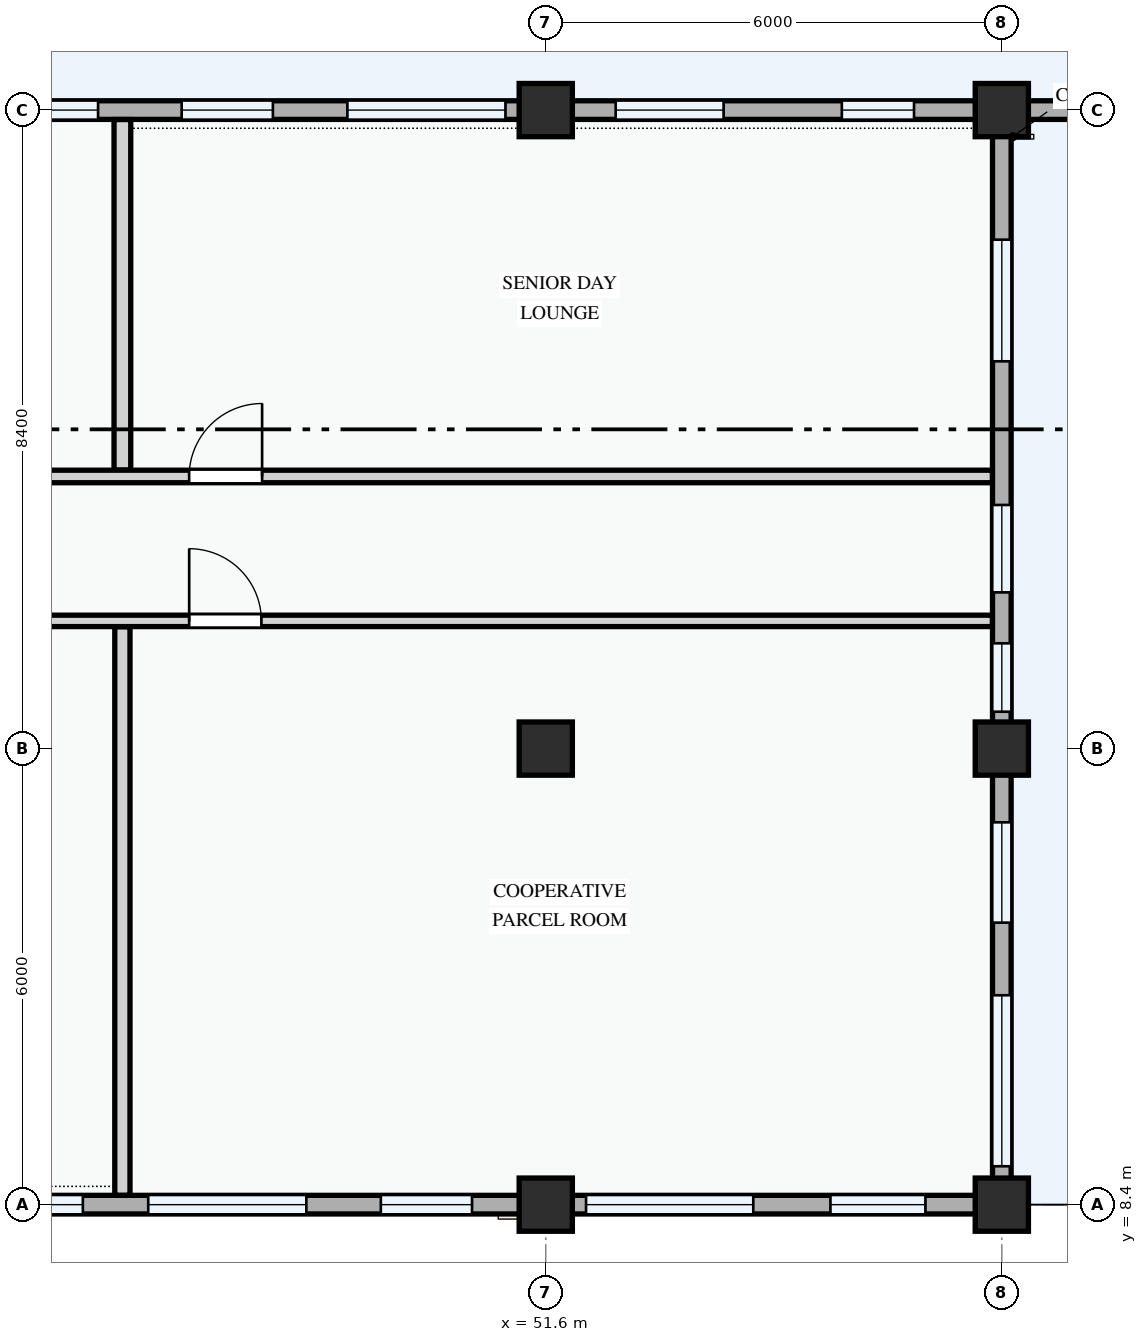
"""IFC4 building model, lengths in metres.
Left out: names, types, materials, properties, quantities, classifications, styles, units other than length and angle.
Written with IfcOpenShell. Run it as: python <this file> out.ifc"""

import sys

from ifc_helpers import new_model, si_unit, direction, frame, frame_2d, origin, origin_2d, place, context, subcontext, project, spatial, rectangle, extrude, element, fill, save


model = new_model("IFC4")
c1 = context("Model", 3, precision=1e-05, world=origin(), true_north=direction((0.0, 1.0)))
c2 = subcontext(c1, "Body", "Model", "MODEL_VIEW")
j1 = project(units=[si_unit("LENGTHUNIT", "METRE"), si_unit("PLANEANGLEUNIT", "RADIAN")], contexts=[c1])
p1 = place(None, origin())
s1 = spatial("IfcSite", under=j1, at=p1, CompositionType="ELEMENT")
p2 = place(p1, origin())
s2 = spatial("IfcBuilding", under=s1, at=p2, CompositionType="ELEMENT")
p3 = place(p2, origin())
s3 = spatial("IfcBuildingStorey", under=s2, at=p3, CompositionType="ELEMENT", Elevation=0.0)
for number, where, z_axis, x_axis in (
    (1, (51.6, 8.4, 0.0), (0.0, 0.0, 1.0), (1.0, 0.0, 0.0)),
    (2, (51.6, 14.4, 0.0), (0.0, 0.0, 1.0), (1.0, 0.0, 0.0)),
    (3, (51.6, 22.8, 0.0), (0.0, 0.0, 1.0), (1.0, 0.0, 0.0)),
    (4, (57.6, 8.4, 0.0), (0.0, 0.0, 1.0), (1.0, 0.0, 0.0)),
    (5, (57.6, 14.4, 0.0), (0.0, 0.0, 1.0), (1.0, 0.0, 0.0)),
    (6, (57.6, 22.8, 0.0), (0.0, 0.0, 1.0), (1.0, 0.0, 0.0)),
):
    element("IfcColumn", number, at=place(p3, frame(where, z_axis=z_axis, x_axis=x_axis)), inside=s3, PredefinedType="COLUMN", context=c2, shape_type="SweptSolid", body=[
        extrude(rectangle(XDim=0.7, YDim=0.7, at=origin_2d()), origin(), (0.0, 0.0, 1.0), 4.5),
    ])
p4 = place(p3, frame((43.2, 8.4, 0.0), z_axis=(0.0, 0.0, 1.0), x_axis=(1.0, 0.0, 0.0)))
e7 = element("IfcWall", 7, at=p4, inside=s3, PredefinedType="STANDARD", context=c2, shape_type="SweptSolid", body=[
    extrude(rectangle(XDim=8.4, YDim=0.245, at=frame_2d((4.2, 0.0))), origin(), (0.0, 0.0, 1.0), 3.485),
])
p5 = place(p4, frame((0.71, 0.0, 0.78)))
e8 = element("IfcOpeningElement", 8, at=p5, cuts=e7, PredefinedType="OPENING", context=c2, shape_type="SweptSolid", body=[
    extrude(rectangle(XDim=1.6, YDim=1.55, at=frame_2d((0.8, 0.775))), frame((0.0, 0.133, 0.0), z_axis=(0.0, -1.0, 0.0), x_axis=(1.0, 0.0, 0.0)), (0.0, 0.0, 1.0), 0.265),
])
p6 = place(p4, frame((3.17, 0.0, 0.78)))
e9 = element("IfcOpeningElement", 9, at=p6, cuts=e7, PredefinedType="OPENING", context=c2, shape_type="SweptSolid", body=[
    extrude(rectangle(XDim=2.08, YDim=1.52, at=frame_2d((1.04, 0.76))), frame((0.0, 0.133, 0.0), z_axis=(0.0, -1.0, 0.0), x_axis=(1.0, 0.0, 0.0)), (0.0, 0.0, 1.0), 0.265),
])
p7 = place(p4, frame((6.23, 0.0, 0.78)))
e10 = element("IfcOpeningElement", 10, at=p7, cuts=e7, PredefinedType="OPENING", context=c2, shape_type="SweptSolid", body=[
    extrude(rectangle(XDim=1.2, YDim=1.5, at=frame_2d((0.6, 0.75))), frame((0.0, 0.133, 0.0), z_axis=(0.0, -1.0, 0.0), x_axis=(1.0, 0.0, 0.0)), (0.0, 0.0, 1.0), 0.265),
])
p8 = place(p3, frame((51.6, 8.4, 0.0), z_axis=(0.0, 0.0, 1.0), x_axis=(1.0, 0.0, 0.0)))
e11 = element("IfcWall", 11, at=p8, inside=s3, PredefinedType="STANDARD", context=c2, shape_type="SweptSolid", body=[
    extrude(rectangle(XDim=6.0, YDim=0.245, at=frame_2d((3.0, 0.0))), origin(), (0.0, 0.0, 1.0), 3.585),
])
p9 = place(p8, frame((0.53, 0.0, 0.78)))
e12 = element("IfcOpeningElement", 12, at=p9, cuts=e11, PredefinedType="OPENING", context=c2, shape_type="SweptSolid", body=[
    extrude(rectangle(XDim=2.2, YDim=1.75, at=frame_2d((1.1, 0.875))), frame((0.0, 0.133, 0.0), z_axis=(0.0, -1.0, 0.0), x_axis=(1.0, 0.0, 0.0)), (0.0, 0.0, 1.0), 0.265),
])
p10 = place(p8, frame((3.745, 0.0, 0.78)))
e13 = element("IfcOpeningElement", 13, at=p10, cuts=e11, PredefinedType="OPENING", context=c2, shape_type="SweptSolid", body=[
    extrude(rectangle(XDim=1.25, YDim=1.45, at=frame_2d((0.625, 0.725))), frame((0.0, 0.133, 0.0), z_axis=(0.0, -1.0, 0.0), x_axis=(1.0, 0.0, 0.0)), (0.0, 0.0, 1.0), 0.265),
])
p11 = place(p3, frame((57.6, 8.4, 0.0), z_axis=(0.0, 0.0, 1.0), x_axis=(0.0, 1.0, 0.0)))
e14 = element("IfcWall", 14, at=p11, inside=s3, PredefinedType="STANDARD", context=c2, shape_type="SweptSolid", body=[
    extrude(rectangle(XDim=6.0, YDim=0.245, at=frame_2d((3.0, 0.0))), origin(), (0.0, 0.0, 1.0), 3.585),
])
p12 = place(p11, frame((0.505, 0.0, 0.78)))
e15 = element("IfcOpeningElement", 15, at=p12, cuts=e14, PredefinedType="OPENING", context=c2, shape_type="SweptSolid", body=[
    extrude(rectangle(XDim=2.25, YDim=1.6, at=frame_2d((1.125, 0.8))), frame((0.0, 0.133, 0.0), z_axis=(0.0, -1.0, 0.0), x_axis=(1.0, 0.0, 0.0)), (0.0, 0.0, 1.0), 0.265),
])
p13 = place(p11, frame((3.71, 0.0, 0.78)))
e16 = element("IfcOpeningElement", 16, at=p13, cuts=e14, PredefinedType="OPENING", context=c2, shape_type="SweptSolid", body=[
    extrude(rectangle(XDim=1.32, YDim=1.35, at=frame_2d((0.66, 0.675))), frame((0.0, 0.133, 0.0), z_axis=(0.0, -1.0, 0.0), x_axis=(1.0, 0.0, 0.0)), (0.0, 0.0, 1.0), 0.265),
])
p14 = place(p3, frame((57.6, 14.4, 0.0), z_axis=(0.0, 0.0, 1.0), x_axis=(0.0, 1.0, 0.0)))
e17 = element("IfcWall", 17, at=p14, inside=s3, PredefinedType="STANDARD", context=c2, shape_type="SweptSolid", body=[
    extrude(rectangle(XDim=8.4, YDim=0.245, at=frame_2d((4.2, 0.0))), origin(), (0.0, 0.0, 1.0), 3.485),
])
p15 = place(p14, frame((0.485, 0.0, 0.78)))
e18 = element("IfcOpeningElement", 18, at=p15, cuts=e17, PredefinedType="OPENING", context=c2, shape_type="SweptSolid", body=[
    extrude(rectangle(XDim=0.9, YDim=1.2, at=frame_2d((0.45, 0.6))), frame((0.0, 0.133, 0.0), z_axis=(0.0, -1.0, 0.0), x_axis=(1.0, 0.0, 0.0)), (0.0, 0.0, 1.0), 0.265),
])
p16 = place(p14, frame((2.055, 0.0, 0.78)))
e19 = element("IfcOpeningElement", 19, at=p16, cuts=e17, PredefinedType="OPENING", context=c2, shape_type="SweptSolid", body=[
    extrude(rectangle(XDim=1.15, YDim=1.25, at=frame_2d((0.575, 0.625))), frame((0.0, 0.133, 0.0), z_axis=(0.0, -1.0, 0.0), x_axis=(1.0, 0.0, 0.0)), (0.0, 0.0, 1.0), 0.265),
])
p17 = place(p14, frame((5.095, 0.0, 0.78)))
e20 = element("IfcOpeningElement", 20, at=p17, cuts=e17, PredefinedType="OPENING", context=c2, shape_type="SweptSolid", body=[
    extrude(rectangle(XDim=1.6, YDim=1.75, at=frame_2d((0.8, 0.875))), frame((0.0, 0.133, 0.0), z_axis=(0.0, -1.0, 0.0), x_axis=(1.0, 0.0, 0.0)), (0.0, 0.0, 1.0), 0.265),
])
p18 = place(p3, frame((57.6, 22.8, 0.0), z_axis=(0.0, 0.0, 1.0), x_axis=(-1.0, 0.0, 0.0)))
e21 = element("IfcWall", 21, at=p18, inside=s3, PredefinedType="STANDARD", context=c2, shape_type="SweptSolid", body=[
    extrude(rectangle(XDim=6.0, YDim=0.245, at=frame_2d((3.0, 0.0))), origin(), (0.0, 0.0, 1.0), 3.585),
])
p19 = place(p18, frame((1.155, 0.0, 0.78)))
e22 = element("IfcOpeningElement", 22, at=p19, cuts=e21, PredefinedType="OPENING", context=c2, shape_type="SweptSolid", body=[
    extrude(rectangle(XDim=0.95, YDim=1.15, at=frame_2d((0.475, 0.575))), frame((0.0, 0.133, 0.0), z_axis=(0.0, -1.0, 0.0), x_axis=(1.0, 0.0, 0.0)), (0.0, 0.0, 1.0), 0.265),
])
p20 = place(p18, frame((3.66, 0.0, 0.78)))
e23 = element("IfcOpeningElement", 23, at=p20, cuts=e21, PredefinedType="OPENING", context=c2, shape_type="SweptSolid", body=[
    extrude(rectangle(XDim=1.42, YDim=1.38, at=frame_2d((0.71, 0.69))), frame((0.0, 0.133, 0.0), z_axis=(0.0, -1.0, 0.0), x_axis=(1.0, 0.0, 0.0)), (0.0, 0.0, 1.0), 0.265),
])
p21 = place(p3, frame((51.6, 22.8, 0.0), z_axis=(0.0, 0.0, 1.0), x_axis=(-1.0, 0.0, 0.0)))
e24 = element("IfcWall", 24, at=p21, inside=s3, PredefinedType="STANDARD", context=c2, shape_type="SweptSolid", body=[
    extrude(rectangle(XDim=8.4, YDim=0.245, at=frame_2d((4.2, 0.0))), origin(), (0.0, 0.0, 1.0), 3.485),
])
p22 = place(p21, frame((0.53, 0.0, 0.78)))
e25 = element("IfcOpeningElement", 25, at=p22, cuts=e24, PredefinedType="OPENING", context=c2, shape_type="SweptSolid", body=[
    extrude(rectangle(XDim=2.08, YDim=1.52, at=frame_2d((1.04, 0.76))), frame((0.0, 0.133, 0.0), z_axis=(0.0, -1.0, 0.0), x_axis=(1.0, 0.0, 0.0)), (0.0, 0.0, 1.0), 0.265),
])
p23 = place(p21, frame((3.59, 0.0, 0.78)))
e26 = element("IfcOpeningElement", 26, at=p23, cuts=e24, PredefinedType="OPENING", context=c2, shape_type="SweptSolid", body=[
    extrude(rectangle(XDim=1.2, YDim=1.5, at=frame_2d((0.6, 0.75))), frame((0.0, 0.133, 0.0), z_axis=(0.0, -1.0, 0.0), x_axis=(1.0, 0.0, 0.0)), (0.0, 0.0, 1.0), 0.265),
])
p24 = place(p21, frame((5.89, 0.0, 0.78)))
e27 = element("IfcOpeningElement", 27, at=p24, cuts=e24, PredefinedType="OPENING", context=c2, shape_type="SweptSolid", body=[
    extrude(rectangle(XDim=2.0, YDim=1.5, at=frame_2d((1.0, 0.75))), frame((0.0, 0.133, 0.0), z_axis=(0.0, -1.0, 0.0), x_axis=(1.0, 0.0, 0.0)), (0.0, 0.0, 1.0), 0.265),
])
p25 = place(p3, frame((57.6, 22.8, 0.0), z_axis=(0.0, 0.0, 1.0), x_axis=(1.0, 0.0, 0.0)))
e28 = element("IfcWall", 28, at=p25, inside=s3, PredefinedType="STANDARD", context=c2, shape_type="SweptSolid", body=[
    extrude(rectangle(XDim=8.4, YDim=0.245, at=frame_2d((4.2, 0.0))), origin(), (0.0, 0.0, 1.0), 2.35),
])
p26 = place(p25, frame((3.475, 0.0, 0.0)))
e29 = element("IfcOpeningElement", 29, at=p26, cuts=e28, PredefinedType="OPENING", context=c2, shape_type="SweptSolid", body=[
    extrude(rectangle(XDim=1.45, YDim=2.1, at=frame_2d((0.725, 1.05))), frame((0.0, 0.133, 0.0), z_axis=(0.0, -1.0, 0.0), x_axis=(1.0, 0.0, 0.0)), (0.0, 0.0, 1.0), 0.265),
])
p27 = place(p3, frame((46.03, 8.524, 0.0), z_axis=(0.0, 0.0, 1.0), x_axis=(0.0, 1.0, 0.0)))
e30 = element("IfcWall", 30, at=p27, inside=s3, PredefinedType="PARTITIONING", context=c2, shape_type="SweptSolid", body=[
    extrude(rectangle(XDim=7.479, YDim=0.2, at=frame_2d((3.739, 0.0))), origin(), (0.0, 0.0, 1.0), 4.2),
])
p28 = place(p3, frame((46.03, 18.064, 0.0), z_axis=(0.0, 0.0, 1.0), x_axis=(0.0, 1.0, 0.0)))
e31 = element("IfcWall", 31, at=p28, inside=s3, PredefinedType="PARTITIONING", context=c2, shape_type="SweptSolid", body=[
    extrude(rectangle(XDim=4.611, YDim=0.22, at=frame_2d((2.306, 0.0))), origin(), (0.0, 0.0, 1.0), 4.2),
])
p29 = place(p3, frame((22.66, 16.08, 0.0), z_axis=(0.0, 0.0, 1.0), x_axis=(1.0, 0.0, 0.0)))
e32 = element("IfcWall", 32, at=p29, inside=s3, PredefinedType="PARTITIONING", context=c2, shape_type="SweptSolid", body=[
    extrude(rectangle(XDim=34.816, YDim=0.15, at=frame_2d((17.408, 0.0))), origin(), (0.0, 0.0, 1.0), 4.2),
])
p30 = place(p29, frame((9.996, 0.0, 0.0)))
e33 = element("IfcOpeningElement", 33, at=p30, cuts=e32, PredefinedType="OPENING", context=c2, shape_type="SweptSolid", body=[
    extrude(rectangle(XDim=0.95, YDim=2.1, at=frame_2d((0.475, 1.05))), frame((0.0, 0.085, 0.0), z_axis=(0.0, -1.0, 0.0), x_axis=(1.0, 0.0, 0.0)), (0.0, 0.0, 1.0), 0.17),
])
p31 = place(p29, frame((16.965, 0.0, 0.0)))
e34 = element("IfcOpeningElement", 34, at=p31, cuts=e32, PredefinedType="OPENING", context=c2, shape_type="SweptSolid", body=[
    extrude(rectangle(XDim=0.95, YDim=2.1, at=frame_2d((0.475, 1.05))), frame((0.0, 0.085, 0.0), z_axis=(0.0, -1.0, 0.0), x_axis=(1.0, 0.0, 0.0)), (0.0, 0.0, 1.0), 0.17),
])
p32 = place(p29, frame((24.249, 0.0, 0.0)))
e35 = element("IfcOpeningElement", 35, at=p32, cuts=e32, PredefinedType="OPENING", context=c2, shape_type="SweptSolid", body=[
    extrude(rectangle(XDim=0.95, YDim=2.1, at=frame_2d((0.475, 1.05))), frame((0.0, 0.085, 0.0), z_axis=(0.0, -1.0, 0.0), x_axis=(1.0, 0.0, 0.0)), (0.0, 0.0, 1.0), 0.17),
])
p33 = place(p3, frame((22.66, 17.98, 0.0), z_axis=(0.0, 0.0, 1.0), x_axis=(1.0, 0.0, 0.0)))
e36 = element("IfcWall", 36, at=p33, inside=s3, PredefinedType="PARTITIONING", context=c2, shape_type="SweptSolid", body=[
    extrude(rectangle(XDim=34.816, YDim=0.165, at=frame_2d((17.408, 0.0))), origin(), (0.0, 0.0, 1.0), 4.2),
])
p34 = place(p33, frame((9.986, 0.0, 0.0)))
e37 = element("IfcOpeningElement", 37, at=p34, cuts=e36, PredefinedType="OPENING", context=c2, shape_type="SweptSolid", body=[
    extrude(rectangle(XDim=0.92, YDim=2.1, at=frame_2d((0.46, 1.05))), frame((0.0, 0.093, 0.0), z_axis=(0.0, -1.0, 0.0), x_axis=(1.0, 0.0, 0.0)), (0.0, 0.0, 1.0), 0.185),
])
p35 = place(p33, frame((16.96, 0.0, 0.0)))
e38 = element("IfcOpeningElement", 38, at=p35, cuts=e36, PredefinedType="OPENING", context=c2, shape_type="SweptSolid", body=[
    extrude(rectangle(XDim=0.92, YDim=2.1, at=frame_2d((0.46, 1.05))), frame((0.0, 0.093, 0.0), z_axis=(0.0, -1.0, 0.0), x_axis=(1.0, 0.0, 0.0)), (0.0, 0.0, 1.0), 0.185),
])
p36 = place(p33, frame((24.248, 0.0, 0.0)))
e39 = element("IfcOpeningElement", 39, at=p36, cuts=e36, PredefinedType="OPENING", context=c2, shape_type="SweptSolid", body=[
    extrude(rectangle(XDim=0.96, YDim=2.12, at=frame_2d((0.48, 1.06))), frame((0.0, 0.093, 0.0), z_axis=(0.0, -1.0, 0.0), x_axis=(1.0, 0.0, 0.0)), (0.0, 0.0, 1.0), 0.185),
])
p37 = place(p5, origin())
e40 = element("IfcWindow", 40, at=p37, inside=s3, PartitioningType="DOUBLE_PANEL_VERTICAL", PredefinedType="WINDOW", context=c2, shape_type="SweptSolid", body=[
    extrude(rectangle(XDim=1.6, YDim=1.55, at=frame_2d((0.8, 0.775))), frame((0.0, 0.03, 0.0), z_axis=(0.0, -1.0, 0.0), x_axis=(1.0, 0.0, 0.0)), (0.0, 0.0, 1.0), 0.06),
])
fill(e8, e40)
p38 = place(p6, origin())
e41 = element("IfcWindow", 41, at=p38, inside=s3, PartitioningType="DOUBLE_PANEL_VERTICAL", PredefinedType="WINDOW", context=c2, shape_type="SweptSolid", body=[
    extrude(rectangle(XDim=2.08, YDim=1.52, at=frame_2d((1.04, 0.76))), frame((0.0, 0.03, 0.0), z_axis=(0.0, -1.0, 0.0), x_axis=(1.0, 0.0, 0.0)), (0.0, 0.0, 1.0), 0.06),
])
fill(e9, e41)
p39 = place(p7, origin())
e42 = element("IfcWindow", 42, at=p39, inside=s3, PartitioningType="SINGLE_PANEL", PredefinedType="WINDOW", context=c2, shape_type="SweptSolid", body=[
    extrude(rectangle(XDim=1.2, YDim=1.5, at=frame_2d((0.6, 0.75))), frame((0.0, 0.03, 0.0), z_axis=(0.0, -1.0, 0.0), x_axis=(1.0, 0.0, 0.0)), (0.0, 0.0, 1.0), 0.06),
])
fill(e10, e42)
p40 = place(p9, origin())
e43 = element("IfcWindow", 43, at=p40, inside=s3, PartitioningType="DOUBLE_PANEL_VERTICAL", PredefinedType="WINDOW", context=c2, shape_type="SweptSolid", body=[
    extrude(rectangle(XDim=2.2, YDim=1.75, at=frame_2d((1.1, 0.875))), frame((0.0, 0.03, 0.0), z_axis=(0.0, -1.0, 0.0), x_axis=(1.0, 0.0, 0.0)), (0.0, 0.0, 1.0), 0.06),
])
fill(e12, e43)
p41 = place(p10, origin())
e44 = element("IfcWindow", 44, at=p41, inside=s3, PartitioningType="SINGLE_PANEL", PredefinedType="WINDOW", context=c2, shape_type="SweptSolid", body=[
    extrude(rectangle(XDim=1.25, YDim=1.45, at=frame_2d((0.625, 0.725))), frame((0.0, 0.03, 0.0), z_axis=(0.0, -1.0, 0.0), x_axis=(1.0, 0.0, 0.0)), (0.0, 0.0, 1.0), 0.06),
])
fill(e13, e44)
p42 = place(p12, origin())
e45 = element("IfcWindow", 45, at=p42, inside=s3, PartitioningType="DOUBLE_PANEL_VERTICAL", PredefinedType="WINDOW", context=c2, shape_type="SweptSolid", body=[
    extrude(rectangle(XDim=2.25, YDim=1.6, at=frame_2d((1.125, 0.8))), frame((0.0, 0.03, 0.0), z_axis=(0.0, -1.0, 0.0), x_axis=(1.0, 0.0, 0.0)), (0.0, 0.0, 1.0), 0.06),
])
fill(e15, e45)
p43 = place(p13, origin())
e46 = element("IfcWindow", 46, at=p43, inside=s3, PartitioningType="SINGLE_PANEL", PredefinedType="WINDOW", context=c2, shape_type="SweptSolid", body=[
    extrude(rectangle(XDim=1.32, YDim=1.35, at=frame_2d((0.66, 0.675))), frame((0.0, 0.03, 0.0), z_axis=(0.0, -1.0, 0.0), x_axis=(1.0, 0.0, 0.0)), (0.0, 0.0, 1.0), 0.06),
])
fill(e16, e46)
p44 = place(p15, origin())
e47 = element("IfcWindow", 47, at=p44, inside=s3, PartitioningType="SINGLE_PANEL", PredefinedType="WINDOW", context=c2, shape_type="SweptSolid", body=[
    extrude(rectangle(XDim=0.9, YDim=1.2, at=frame_2d((0.45, 0.6))), frame((0.0, 0.03, 0.0), z_axis=(0.0, -1.0, 0.0), x_axis=(1.0, 0.0, 0.0)), (0.0, 0.0, 1.0), 0.06),
])
fill(e18, e47)
p45 = place(p16, origin())
e48 = element("IfcWindow", 48, at=p45, inside=s3, PartitioningType="SINGLE_PANEL", PredefinedType="WINDOW", context=c2, shape_type="SweptSolid", body=[
    extrude(rectangle(XDim=1.15, YDim=1.25, at=frame_2d((0.575, 0.625))), frame((0.0, 0.03, 0.0), z_axis=(0.0, -1.0, 0.0), x_axis=(1.0, 0.0, 0.0)), (0.0, 0.0, 1.0), 0.06),
])
fill(e19, e48)
p46 = place(p17, origin())
e49 = element("IfcWindow", 49, at=p46, inside=s3, PartitioningType="DOUBLE_PANEL_VERTICAL", PredefinedType="WINDOW", context=c2, shape_type="SweptSolid", body=[
    extrude(rectangle(XDim=1.6, YDim=1.75, at=frame_2d((0.8, 0.875))), frame((0.0, 0.03, 0.0), z_axis=(0.0, -1.0, 0.0), x_axis=(1.0, 0.0, 0.0)), (0.0, 0.0, 1.0), 0.06),
])
fill(e20, e49)
p47 = place(p19, origin())
e50 = element("IfcWindow", 50, at=p47, inside=s3, PartitioningType="SINGLE_PANEL", PredefinedType="WINDOW", context=c2, shape_type="SweptSolid", body=[
    extrude(rectangle(XDim=0.95, YDim=1.15, at=frame_2d((0.475, 0.575))), frame((0.0, 0.03, 0.0), z_axis=(0.0, -1.0, 0.0), x_axis=(1.0, 0.0, 0.0)), (0.0, 0.0, 1.0), 0.06),
])
fill(e22, e50)
p48 = place(p20, origin())
e51 = element("IfcWindow", 51, at=p48, inside=s3, PartitioningType="SINGLE_PANEL", PredefinedType="WINDOW", context=c2, shape_type="SweptSolid", body=[
    extrude(rectangle(XDim=1.42, YDim=1.38, at=frame_2d((0.71, 0.69))), frame((0.0, 0.03, 0.0), z_axis=(0.0, -1.0, 0.0), x_axis=(1.0, 0.0, 0.0)), (0.0, 0.0, 1.0), 0.06),
])
fill(e23, e51)
p49 = place(p22, origin())
e52 = element("IfcWindow", 52, at=p49, inside=s3, PartitioningType="DOUBLE_PANEL_VERTICAL", PredefinedType="WINDOW", context=c2, shape_type="SweptSolid", body=[
    extrude(rectangle(XDim=2.08, YDim=1.52, at=frame_2d((1.04, 0.76))), frame((0.0, 0.03, 0.0), z_axis=(0.0, -1.0, 0.0), x_axis=(1.0, 0.0, 0.0)), (0.0, 0.0, 1.0), 0.06),
])
fill(e25, e52)
p50 = place(p23, origin())
e53 = element("IfcWindow", 53, at=p50, inside=s3, PartitioningType="SINGLE_PANEL", PredefinedType="WINDOW", context=c2, shape_type="SweptSolid", body=[
    extrude(rectangle(XDim=1.2, YDim=1.5, at=frame_2d((0.6, 0.75))), frame((0.0, 0.03, 0.0), z_axis=(0.0, -1.0, 0.0), x_axis=(1.0, 0.0, 0.0)), (0.0, 0.0, 1.0), 0.06),
])
fill(e26, e53)
p51 = place(p24, origin())
e54 = element("IfcWindow", 54, at=p51, inside=s3, PartitioningType="DOUBLE_PANEL_VERTICAL", PredefinedType="WINDOW", context=c2, shape_type="SweptSolid", body=[
    extrude(rectangle(XDim=2.0, YDim=1.5, at=frame_2d((1.0, 0.75))), frame((0.0, 0.03, 0.0), z_axis=(0.0, -1.0, 0.0), x_axis=(1.0, 0.0, 0.0)), (0.0, 0.0, 1.0), 0.06),
])
fill(e27, e54)
p52 = place(p32, origin())
e55 = element("IfcDoor", 55, at=p52, inside=s3, OperationType="SINGLE_SWING_LEFT", PredefinedType="DOOR", context=c2, shape_type="SweptSolid", body=[
    extrude(rectangle(XDim=0.95, YDim=2.1, at=frame_2d((0.475, 1.05))), frame((0.0, 0.025, 0.0), z_axis=(0.0, -1.0, 0.0), x_axis=(1.0, 0.0, 0.0)), (0.0, 0.0, 1.0), 0.05),
])
fill(e35, e55)
p53 = place(p36, origin())
e56 = element("IfcDoor", 56, at=p53, inside=s3, OperationType="SINGLE_SWING_RIGHT", PredefinedType="DOOR", context=c2, shape_type="SweptSolid", body=[
    extrude(rectangle(XDim=0.96, YDim=2.12, at=frame_2d((0.48, 1.06))), frame((0.0, 0.025, 0.0), z_axis=(0.0, -1.0, 0.0), x_axis=(1.0, 0.0, 0.0)), (0.0, 0.0, 1.0), 0.05),
])
fill(e39, e56)
save(model, sys.argv[1])
